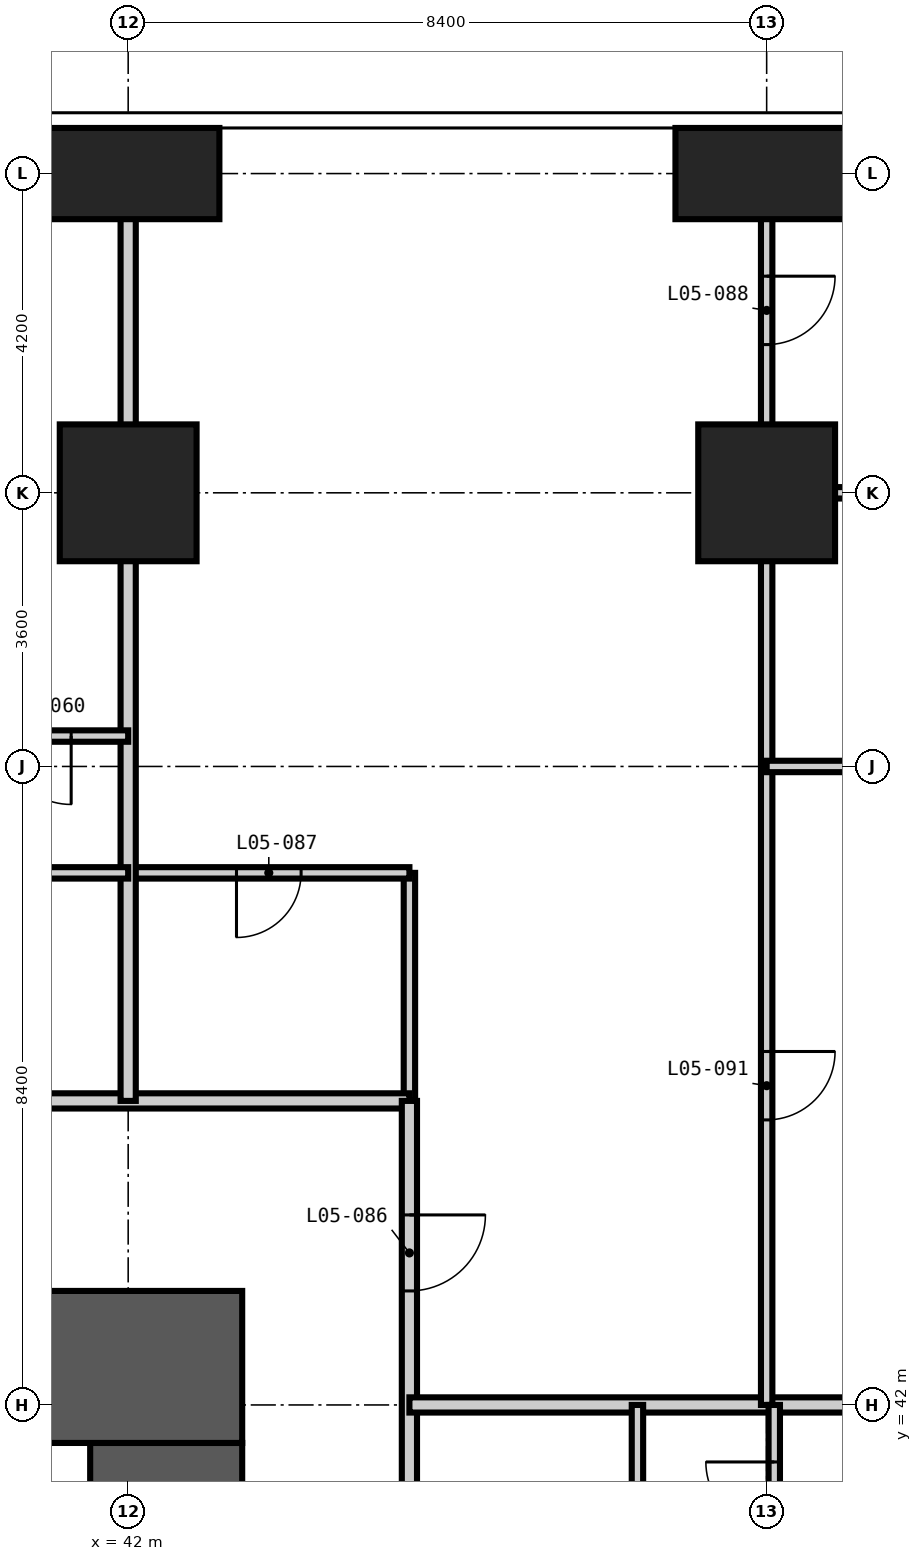
"""IFC4 building model, lengths in metres.
Left out: names, types, materials, properties, quantities, classifications, styles, units other than length and angle.
Written with IfcOpenShell. Run it as: python <this file> out.ifc"""

import sys

from ifc_helpers import new_model, si_unit, direction, frame, frame_2d, origin, origin_2d, place, context, subcontext, project, spatial, rectangle, extrude, element, fill, save


model = new_model("IFC4")
c1 = context("Model", 3, precision=1e-05, world=origin(), true_north=direction((0.0, 1.0)))
c2 = subcontext(c1, "Body", "Model", "MODEL_VIEW")
j1 = project(units=[si_unit("LENGTHUNIT", "METRE"), si_unit("PLANEANGLEUNIT", "RADIAN")], contexts=[c1])
p1 = place(None, origin())
s1 = spatial("IfcSite", under=j1, at=p1, CompositionType="ELEMENT")
p2 = place(p1, origin())
s2 = spatial("IfcBuilding", under=s1, at=p2, CompositionType="ELEMENT")
p3 = place(p2, frame((0.0, 0.0, 27.0)))
s3 = spatial("IfcBuildingStorey", under=s2, at=p3, CompositionType="ELEMENT", Elevation=27.0)
p4 = place(p3, frame((42.0, 54.0, -0.35), z_axis=(0.0, 0.0, 1.0), x_axis=(1.0, 0.0, 0.0)))
e1 = element("IfcColumn", 1, at=p4, inside=s3, PredefinedType="COLUMN", context=c2, shape_type="SweptSolid", body=[
    extrude(rectangle(XDim=1.8, YDim=1.8, at=origin_2d()), origin(), (0.0, 0.0, 1.0), 3.6),
])
p5 = place(p3, frame((42.0, 58.2, -0.35), z_axis=(0.0, 0.0, 1.0), x_axis=(1.0, 0.0, 0.0)))
e2 = element("IfcColumn", 2, at=p5, inside=s3, PredefinedType="COLUMN", context=c2, shape_type="SweptSolid", body=[
    extrude(rectangle(XDim=2.4, YDim=1.2, at=origin_2d()), origin(), (0.0, 0.0, 1.0), 3.6),
])
p6 = place(p3, frame((50.4, 54.0, -0.35), z_axis=(0.0, 0.0, 1.0), x_axis=(1.0, 0.0, 0.0)))
e3 = element("IfcColumn", 3, at=p6, inside=s3, PredefinedType="COLUMN", context=c2, shape_type="SweptSolid", body=[
    extrude(rectangle(XDim=1.8, YDim=1.8, at=origin_2d()), origin(), (0.0, 0.0, 1.0), 3.6),
])
p7 = place(p3, frame((50.4, 58.2, -0.35), z_axis=(0.0, 0.0, 1.0), x_axis=(1.0, 0.0, 0.0)))
e4 = element("IfcColumn", 4, at=p7, inside=s3, PredefinedType="COLUMN", context=c2, shape_type="SweptSolid", body=[
    extrude(rectangle(XDim=2.4, YDim=1.2, at=origin_2d()), origin(), (0.0, 0.0, 1.0), 3.6),
])
p8 = place(p3, frame((42.5, 17.3, -0.35), z_axis=(0.0, 0.0, 1.0), x_axis=(0.0, 1.0, 0.0)))
e5 = element("IfcWall", 5, at=p8, inside=s3, PredefinedType="SHEAR", context=c2, shape_type="SweptSolid", body=[
    extrude(rectangle(XDim=24.2, YDim=2.0, at=frame_2d((12.1, 0.0))), origin(), (0.0, 0.0, 1.0), 3.6),
])
p9 = place(p8, frame((0.3, 0.0, 0.35)))
e6 = element("IfcOpeningElement", 6, at=p9, cuts=e5, PredefinedType="OPENING", context=c2, shape_type="SweptSolid", body=[
    extrude(rectangle(XDim=1.2, YDim=2.2, at=frame_2d((0.6, 1.1))), frame((0.0, 1.01, 0.0), z_axis=(0.0, -1.0, 0.0), x_axis=(1.0, 0.0, 0.0)), (0.0, 0.0, 1.0), 2.02),
])
p10 = place(p8, frame((11.6, 0.0, 0.35)))
e7 = element("IfcOpeningElement", 7, at=p10, cuts=e5, PredefinedType="OPENING", context=c2, shape_type="SweptSolid", body=[
    extrude(rectangle(XDim=1.0, YDim=2.1, at=frame_2d((0.5, 1.05))), frame((0.0, 1.01, 0.0), z_axis=(0.0, -1.0, 0.0), x_axis=(1.0, 0.0, 0.0)), (0.0, 0.0, 1.0), 2.02),
])
p11 = place(p8, frame((20.0, 0.0, 0.35)))
e8 = element("IfcOpeningElement", 8, at=p11, cuts=e5, PredefinedType="OPENING", context=c2, shape_type="SweptSolid", body=[
    extrude(rectangle(XDim=1.0, YDim=2.1, at=frame_2d((0.5, 1.05))), frame((0.0, 1.01, 0.0), z_axis=(0.0, -1.0, 0.0), x_axis=(1.0, 0.0, 0.0)), (0.0, 0.0, 1.0), 2.02),
])
p12 = place(p3, frame((43.5, 42.5, -0.35), z_axis=(0.0, 0.0, 1.0), x_axis=(-1.0, 0.0, 0.0)))
e9 = element("IfcWall", 9, at=p12, inside=s3, PredefinedType="SHEAR", context=c2, shape_type="SweptSolid", body=[
    extrude(rectangle(XDim=28.2, YDim=2.0, at=frame_2d((14.1, 0.0))), origin(), (0.0, 0.0, 1.0), 3.6),
])
p13 = place(p12, frame((22.0, 0.0, 0.35)))
e10 = element("IfcOpeningElement", 10, at=p13, cuts=e9, PredefinedType="OPENING", context=c2, shape_type="SweptSolid", body=[
    extrude(rectangle(XDim=1.0, YDim=2.1, at=frame_2d((0.5, 1.05))), frame((0.0, 1.01, 0.0), z_axis=(0.0, -1.0, 0.0), x_axis=(1.0, 0.0, 0.0)), (0.0, 0.0, 1.0), 2.02),
])
p14 = place(p12, frame((11.4, 0.0, 0.35)))
e11 = element("IfcOpeningElement", 11, at=p14, cuts=e9, PredefinedType="OPENING", context=c2, shape_type="SweptSolid", body=[
    extrude(rectangle(XDim=1.2, YDim=2.2, at=frame_2d((0.6, 1.1))), frame((0.0, 1.01, 0.0), z_axis=(0.0, -1.0, 0.0), x_axis=(1.0, 0.0, 0.0)), (0.0, 0.0, 1.0), 2.02),
])
p15 = place(p3, frame((45.7, 46.0, 0.0), z_axis=(0.0, 0.0, 1.0), x_axis=(0.0, 1.0, 0.0)))
e12 = element("IfcWall", 12, at=p15, inside=s3, PredefinedType="PARTITIONING", context=c2, shape_type="SweptSolid", body=[
    extrude(rectangle(XDim=3.0, YDim=0.15, at=frame_2d((1.5, 0.0))), origin(), (0.0, 0.0, 1.0), 3.25),
])
p16 = place(p3, frame((42.0, 49.0, 0.0), z_axis=(0.0, 0.0, 1.0), x_axis=(1.0, 0.0, 0.0)))
e13 = element("IfcWall", 13, at=p16, inside=s3, PredefinedType="PARTITIONING", context=c2, shape_type="SweptSolid", body=[
    extrude(rectangle(XDim=3.7, YDim=0.15, at=frame_2d((1.85, 0.0))), origin(), (0.0, 0.0, 1.0), 3.25),
])
p17 = place(p16, frame((1.425, 0.0, 0.0)))
e14 = element("IfcOpeningElement", 14, at=p17, cuts=e13, PredefinedType="OPENING", context=c2, shape_type="SweptSolid", body=[
    extrude(rectangle(XDim=0.85, YDim=2.1, at=frame_2d((0.425, 1.05))), frame((0.0, 0.085, 0.0), z_axis=(0.0, -1.0, 0.0), x_axis=(1.0, 0.0, 0.0)), (0.0, 0.0, 1.0), 0.17),
])
p18 = place(p3, frame((50.4, 54.0, 0.0), z_axis=(0.0, 0.0, 1.0), x_axis=(1.0, 0.0, 0.0)))
e15 = element("IfcWall", 15, at=p18, inside=s3, PredefinedType="PARTITIONING", context=c2, shape_type="SweptSolid", body=[
    extrude(rectangle(XDim=3.0, YDim=0.15, at=frame_2d((1.5, 0.0))), origin(), (0.0, 0.0, 1.0), 3.25),
])
p19 = place(p3, frame((13.4, 46.0, 0.0), z_axis=(0.0, 0.0, 1.0), x_axis=(1.0, 0.0, 0.0)))
e16 = element("IfcWall", 16, at=p19, inside=s3, PredefinedType="PARTITIONING", context=c2, shape_type="SweptSolid", body=[
    extrude(rectangle(XDim=32.3, YDim=0.2, at=frame_2d((16.15, 0.0))), origin(), (0.0, 0.0, 1.0), 3.25),
])
p20 = place(p19, frame((6.2, 0.0, 0.0)))
e17 = element("IfcOpeningElement", 17, at=p20, cuts=e16, PredefinedType="OPENING", context=c2, shape_type="SweptSolid", body=[
    extrude(rectangle(XDim=1.0, YDim=2.2, at=frame_2d((0.5, 1.1))), frame((0.0, 0.11, 0.0), z_axis=(0.0, -1.0, 0.0), x_axis=(1.0, 0.0, 0.0)), (0.0, 0.0, 1.0), 0.22),
])
p21 = place(p19, frame((8.0, 0.0, 0.0)))
e18 = element("IfcOpeningElement", 18, at=p21, cuts=e16, PredefinedType="OPENING", context=c2, shape_type="SweptSolid", body=[
    extrude(rectangle(XDim=1.0, YDim=2.2, at=frame_2d((0.5, 1.1))), frame((0.0, 0.11, 0.0), z_axis=(0.0, -1.0, 0.0), x_axis=(1.0, 0.0, 0.0)), (0.0, 0.0, 1.0), 0.22),
])
p22 = place(p19, frame((14.6, 0.0, 0.0)))
e19 = element("IfcOpeningElement", 19, at=p22, cuts=e16, PredefinedType="OPENING", context=c2, shape_type="SweptSolid", body=[
    extrude(rectangle(XDim=1.0, YDim=2.2, at=frame_2d((0.5, 1.1))), frame((0.0, 0.11, 0.0), z_axis=(0.0, -1.0, 0.0), x_axis=(1.0, 0.0, 0.0)), (0.0, 0.0, 1.0), 0.22),
])
p23 = place(p19, frame((16.4, 0.0, 0.0)))
e20 = element("IfcOpeningElement", 20, at=p23, cuts=e16, PredefinedType="OPENING", context=c2, shape_type="SweptSolid", body=[
    extrude(rectangle(XDim=1.0, YDim=2.2, at=frame_2d((0.5, 1.1))), frame((0.0, 0.11, 0.0), z_axis=(0.0, -1.0, 0.0), x_axis=(1.0, 0.0, 0.0)), (0.0, 0.0, 1.0), 0.22),
])
p24 = place(p19, frame((23.0, 0.0, 0.0)))
e21 = element("IfcOpeningElement", 21, at=p24, cuts=e16, PredefinedType="OPENING", context=c2, shape_type="SweptSolid", body=[
    extrude(rectangle(XDim=1.0, YDim=2.2, at=frame_2d((0.5, 1.1))), frame((0.0, 0.11, 0.0), z_axis=(0.0, -1.0, 0.0), x_axis=(1.0, 0.0, 0.0)), (0.0, 0.0, 1.0), 0.22),
])
p25 = place(p19, frame((24.8, 0.0, 0.0)))
e22 = element("IfcOpeningElement", 22, at=p25, cuts=e16, PredefinedType="OPENING", context=c2, shape_type="SweptSolid", body=[
    extrude(rectangle(XDim=1.0, YDim=2.2, at=frame_2d((0.5, 1.1))), frame((0.0, 0.11, 0.0), z_axis=(0.0, -1.0, 0.0), x_axis=(1.0, 0.0, 0.0)), (0.0, 0.0, 1.0), 0.22),
])
p26 = place(p3, frame((45.7, 46.0, 0.0), z_axis=(0.0, 0.0, 1.0), x_axis=(0.0, -1.0, 0.0)))
e23 = element("IfcWall", 23, at=p26, inside=s3, PredefinedType="PARTITIONING", context=c2, shape_type="SweptSolid", body=[
    extrude(rectangle(XDim=32.6, YDim=0.2, at=frame_2d((16.3, 0.0))), origin(), (0.0, 0.0, 1.0), 3.25),
])
p27 = place(p26, frame((26.6, 0.0, 0.0)))
e24 = element("IfcOpeningElement", 24, at=p27, cuts=e23, PredefinedType="OPENING", context=c2, shape_type="SweptSolid", body=[
    extrude(rectangle(XDim=1.0, YDim=2.2, at=frame_2d((0.5, 1.1))), frame((0.0, 0.11, 0.0), z_axis=(0.0, -1.0, 0.0), x_axis=(1.0, 0.0, 0.0)), (0.0, 0.0, 1.0), 0.22),
])
p28 = place(p26, frame((22.4, 0.0, 0.0)))
e25 = element("IfcOpeningElement", 25, at=p28, cuts=e23, PredefinedType="OPENING", context=c2, shape_type="SweptSolid", body=[
    extrude(rectangle(XDim=1.0, YDim=2.2, at=frame_2d((0.5, 1.1))), frame((0.0, 0.11, 0.0), z_axis=(0.0, -1.0, 0.0), x_axis=(1.0, 0.0, 0.0)), (0.0, 0.0, 1.0), 0.22),
])
p29 = place(p26, frame((17.0, 0.0, 0.0)))
e26 = element("IfcOpeningElement", 26, at=p29, cuts=e23, PredefinedType="OPENING", context=c2, shape_type="SweptSolid", body=[
    extrude(rectangle(XDim=1.0, YDim=2.2, at=frame_2d((0.5, 1.1))), frame((0.0, 0.11, 0.0), z_axis=(0.0, -1.0, 0.0), x_axis=(1.0, 0.0, 0.0)), (0.0, 0.0, 1.0), 0.22),
])
p30 = place(p26, frame((15.2, 0.0, 0.0)))
e27 = element("IfcOpeningElement", 27, at=p30, cuts=e23, PredefinedType="OPENING", context=c2, shape_type="SweptSolid", body=[
    extrude(rectangle(XDim=1.0, YDim=2.2, at=frame_2d((0.5, 1.1))), frame((0.0, 0.11, 0.0), z_axis=(0.0, -1.0, 0.0), x_axis=(1.0, 0.0, 0.0)), (0.0, 0.0, 1.0), 0.22),
])
p31 = place(p26, frame((8.6, 0.0, 0.0)))
e28 = element("IfcOpeningElement", 28, at=p31, cuts=e23, PredefinedType="OPENING", context=c2, shape_type="SweptSolid", body=[
    extrude(rectangle(XDim=1.0, YDim=2.2, at=frame_2d((0.5, 1.1))), frame((0.0, 0.11, 0.0), z_axis=(0.0, -1.0, 0.0), x_axis=(1.0, 0.0, 0.0)), (0.0, 0.0, 1.0), 0.22),
])
p32 = place(p26, frame((6.8, 0.0, 0.0)))
e29 = element("IfcOpeningElement", 29, at=p32, cuts=e23, PredefinedType="OPENING", context=c2, shape_type="SweptSolid", body=[
    extrude(rectangle(XDim=1.0, YDim=2.2, at=frame_2d((0.5, 1.1))), frame((0.0, 0.11, 0.0), z_axis=(0.0, -1.0, 0.0), x_axis=(1.0, 0.0, 0.0)), (0.0, 0.0, 1.0), 0.22),
])
p33 = place(p26, frame((30.4, 0.0, 0.0)))
e30 = element("IfcOpeningElement", 30, at=p33, cuts=e23, PredefinedType="OPENING", context=c2, shape_type="SweptSolid", body=[
    extrude(rectangle(XDim=1.0, YDim=2.2, at=frame_2d((0.5, 1.1))), frame((0.0, 0.11, 0.0), z_axis=(0.0, -1.0, 0.0), x_axis=(1.0, 0.0, 0.0)), (0.0, 0.0, 1.0), 0.22),
])
p34 = place(p26, frame((1.5, 0.0, 0.0)))
e31 = element("IfcOpeningElement", 31, at=p34, cuts=e23, PredefinedType="OPENING", context=c2, shape_type="SweptSolid", body=[
    extrude(rectangle(XDim=1.0, YDim=2.2, at=frame_2d((0.5, 1.1))), frame((0.0, 0.11, 0.0), z_axis=(0.0, -1.0, 0.0), x_axis=(1.0, 0.0, 0.0)), (0.0, 0.0, 1.0), 0.22),
])
p35 = place(p3, frame((42.0, 46.0, 0.0), z_axis=(0.0, 0.0, 1.0), x_axis=(0.0, 1.0, 0.0)))
e32 = element("IfcWall", 32, at=p35, inside=s3, PredefinedType="PARTITIONING", context=c2, shape_type="SweptSolid", body=[
    extrude(rectangle(XDim=12.808, YDim=0.2, at=frame_2d((6.404, 0.0))), origin(), (0.0, 0.0, 1.0), 3.25),
])
p36 = place(p3, frame((45.7, 42.0, 0.0), z_axis=(0.0, 0.0, 1.0), x_axis=(1.0, 0.0, 0.0)))
e33 = element("IfcWall", 33, at=p36, inside=s3, PredefinedType="PARTITIONING", context=c2, shape_type="SweptSolid", body=[
    extrude(rectangle(XDim=13.108, YDim=0.2, at=frame_2d((6.554, 0.0))), origin(), (0.0, 0.0, 1.0), 3.25),
])
p37 = place(p3, frame((48.7, 39.6, 0.0), z_axis=(0.0, 0.0, 1.0), x_axis=(0.0, 1.0, 0.0)))
e34 = element("IfcWall", 34, at=p37, inside=s3, PredefinedType="PARTITIONING", context=c2, shape_type="SweptSolid", body=[
    extrude(rectangle(XDim=2.4, YDim=0.15, at=frame_2d((1.2, 0.0))), origin(), (0.0, 0.0, 1.0), 3.25),
])
p38 = place(p3, frame((50.4, 42.0, 0.0), z_axis=(0.0, 0.0, 1.0), x_axis=(0.0, 1.0, 0.0)))
e35 = element("IfcWall", 35, at=p38, inside=s3, PredefinedType="PARTITIONING", context=c2, shape_type="SweptSolid", body=[
    extrude(rectangle(XDim=16.808, YDim=0.15, at=frame_2d((8.404, 0.0))), origin(), (0.0, 0.0, 1.0), 3.25),
])
p39 = place(p38, frame((13.95, 0.0, 0.0)))
e36 = element("IfcOpeningElement", 36, at=p39, cuts=e35, PredefinedType="OPENING", context=c2, shape_type="SweptSolid", body=[
    extrude(rectangle(XDim=0.9, YDim=2.1, at=frame_2d((0.45, 1.05))), frame((0.0, 0.085, 0.0), z_axis=(0.0, -1.0, 0.0), x_axis=(1.0, 0.0, 0.0)), (0.0, 0.0, 1.0), 0.17),
])
p40 = place(p38, frame((3.75, 0.0, 0.0)))
e37 = element("IfcOpeningElement", 37, at=p40, cuts=e35, PredefinedType="OPENING", context=c2, shape_type="SweptSolid", body=[
    extrude(rectangle(XDim=0.9, YDim=2.1, at=frame_2d((0.45, 1.05))), frame((0.0, 0.085, 0.0), z_axis=(0.0, -1.0, 0.0), x_axis=(1.0, 0.0, 0.0)), (0.0, 0.0, 1.0), 0.17),
])
p41 = place(p3, frame((50.5, 39.6, 0.0), z_axis=(0.0, 0.0, 1.0), x_axis=(0.0, 1.0, 0.0)))
e38 = element("IfcWall", 38, at=p41, inside=s3, PredefinedType="PARTITIONING", context=c2, shape_type="SweptSolid", body=[
    extrude(rectangle(XDim=2.4, YDim=0.15, at=frame_2d((1.2, 0.0))), origin(), (0.0, 0.0, 1.0), 3.25),
])
p42 = place(p41, frame((0.75, 0.0, 0.0)))
e39 = element("IfcOpeningElement", 39, at=p42, cuts=e38, PredefinedType="OPENING", context=c2, shape_type="SweptSolid", body=[
    extrude(rectangle(XDim=0.9, YDim=2.1, at=frame_2d((0.45, 1.05))), frame((0.0, 0.085, 0.0), z_axis=(0.0, -1.0, 0.0), x_axis=(1.0, 0.0, 0.0)), (0.0, 0.0, 1.0), 0.17),
])
p43 = place(p3, frame((39.6, 49.0, 0.0), z_axis=(0.0, 0.0, 1.0), x_axis=(1.0, 0.0, 0.0)))
e40 = element("IfcWall", 40, at=p43, inside=s3, PredefinedType="PARTITIONING", context=c2, shape_type="SweptSolid", body=[
    extrude(rectangle(XDim=2.4, YDim=0.15, at=frame_2d((1.2, 0.0))), origin(), (0.0, 0.0, 1.0), 3.25),
])
p44 = place(p3, frame((50.4, 50.4, 0.0), z_axis=(0.0, 0.0, 1.0), x_axis=(1.0, 0.0, 0.0)))
e41 = element("IfcWall", 41, at=p44, inside=s3, PredefinedType="PARTITIONING", context=c2, shape_type="SweptSolid", body=[
    extrude(rectangle(XDim=8.408, YDim=0.15, at=frame_2d((4.204, 0.0))), origin(), (0.0, 0.0, 1.0), 3.25),
])
p45 = place(p44, frame((4.55, 0.0, 0.0)))
e42 = element("IfcOpeningElement", 42, at=p45, cuts=e41, PredefinedType="OPENING", context=c2, shape_type="SweptSolid", body=[
    extrude(rectangle(XDim=0.9, YDim=2.1, at=frame_2d((0.45, 1.05))), frame((0.0, 0.085, 0.0), z_axis=(0.0, -1.0, 0.0), x_axis=(1.0, 0.0, 0.0)), (0.0, 0.0, 1.0), 0.17),
])
p46 = place(p3, frame((39.6, 50.8, 0.0), z_axis=(0.0, 0.0, 1.0), x_axis=(1.0, 0.0, 0.0)))
e43 = element("IfcWall", 43, at=p46, inside=s3, PredefinedType="PARTITIONING", context=c2, shape_type="SweptSolid", body=[
    extrude(rectangle(XDim=2.4, YDim=0.15, at=frame_2d((1.2, 0.0))), origin(), (0.0, 0.0, 1.0), 3.25),
])
p47 = place(p46, frame((0.75, 0.0, 0.0)))
e44 = element("IfcOpeningElement", 44, at=p47, cuts=e43, PredefinedType="OPENING", context=c2, shape_type="SweptSolid", body=[
    extrude(rectangle(XDim=0.9, YDim=2.1, at=frame_2d((0.45, 1.05))), frame((0.0, 0.085, 0.0), z_axis=(0.0, -1.0, 0.0), x_axis=(1.0, 0.0, 0.0)), (0.0, 0.0, 1.0), 0.17),
])
p48 = place(p42, origin())
e45 = element("IfcDoor", 45, at=p48, inside=s3, OperationType="SINGLE_SWING_RIGHT", PredefinedType="DOOR", context=c2, shape_type="SweptSolid", body=[
    extrude(rectangle(XDim=0.9, YDim=2.1, at=frame_2d((0.45, 1.05))), frame((0.0, 0.025, 0.0), z_axis=(0.0, -1.0, 0.0), x_axis=(1.0, 0.0, 0.0)), (0.0, 0.0, 1.0), 0.05),
])
fill(e39, e45)
p49 = place(p47, frame((0.9, 0.0, 0.0), z_axis=(0.0, 0.0, 1.0), x_axis=(-1.0, 0.0, 0.0)))
e46 = element("IfcDoor", 46, at=p49, inside=s3, OperationType="SINGLE_SWING_LEFT", PredefinedType="DOOR", context=c2, shape_type="SweptSolid", body=[
    extrude(rectangle(XDim=0.9, YDim=2.1, at=frame_2d((0.45, 1.05))), frame((0.0, 0.025, 0.0), z_axis=(0.0, -1.0, 0.0), x_axis=(1.0, 0.0, 0.0)), (0.0, 0.0, 1.0), 0.05),
])
fill(e44, e46)
p50 = place(p34, origin())
e47 = element("IfcDoor", 47, at=p50, inside=s3, OperationType="SINGLE_SWING_LEFT", PredefinedType="DOOR", context=c2, shape_type="SweptSolid", body=[
    extrude(rectangle(XDim=1.0, YDim=2.2, at=frame_2d((0.5, 1.1))), frame((0.0, 0.025, 0.0), z_axis=(0.0, -1.0, 0.0), x_axis=(1.0, 0.0, 0.0)), (0.0, 0.0, 1.0), 0.05),
])
fill(e31, e47)
p51 = place(p17, frame((0.85, 0.0, 0.0), z_axis=(0.0, 0.0, 1.0), x_axis=(-1.0, 0.0, 0.0)))
e48 = element("IfcDoor", 48, at=p51, inside=s3, OperationType="SINGLE_SWING_RIGHT", PredefinedType="DOOR", context=c2, shape_type="SweptSolid", body=[
    extrude(rectangle(XDim=0.85, YDim=2.1, at=frame_2d((0.425, 1.05))), frame((0.0, 0.025, 0.0), z_axis=(0.0, -1.0, 0.0), x_axis=(1.0, 0.0, 0.0)), (0.0, 0.0, 1.0), 0.05),
])
fill(e14, e48)
p52 = place(p39, frame((0.9, 0.0, 0.0), z_axis=(0.0, 0.0, 1.0), x_axis=(-1.0, 0.0, 0.0)))
e49 = element("IfcDoor", 49, at=p52, inside=s3, OperationType="SINGLE_SWING_LEFT", PredefinedType="DOOR", context=c2, shape_type="SweptSolid", body=[
    extrude(rectangle(XDim=0.9, YDim=2.1, at=frame_2d((0.45, 1.05))), frame((0.0, 0.025, 0.0), z_axis=(0.0, -1.0, 0.0), x_axis=(1.0, 0.0, 0.0)), (0.0, 0.0, 1.0), 0.05),
])
fill(e36, e49)
p53 = place(p40, frame((0.9, 0.0, 0.0), z_axis=(0.0, 0.0, 1.0), x_axis=(-1.0, 0.0, 0.0)))
e50 = element("IfcDoor", 50, at=p53, inside=s3, OperationType="SINGLE_SWING_LEFT", PredefinedType="DOOR", context=c2, shape_type="SweptSolid", body=[
    extrude(rectangle(XDim=0.9, YDim=2.1, at=frame_2d((0.45, 1.05))), frame((0.0, 0.025, 0.0), z_axis=(0.0, -1.0, 0.0), x_axis=(1.0, 0.0, 0.0)), (0.0, 0.0, 1.0), 0.05),
])
fill(e37, e50)
save(model, sys.argv[1])
